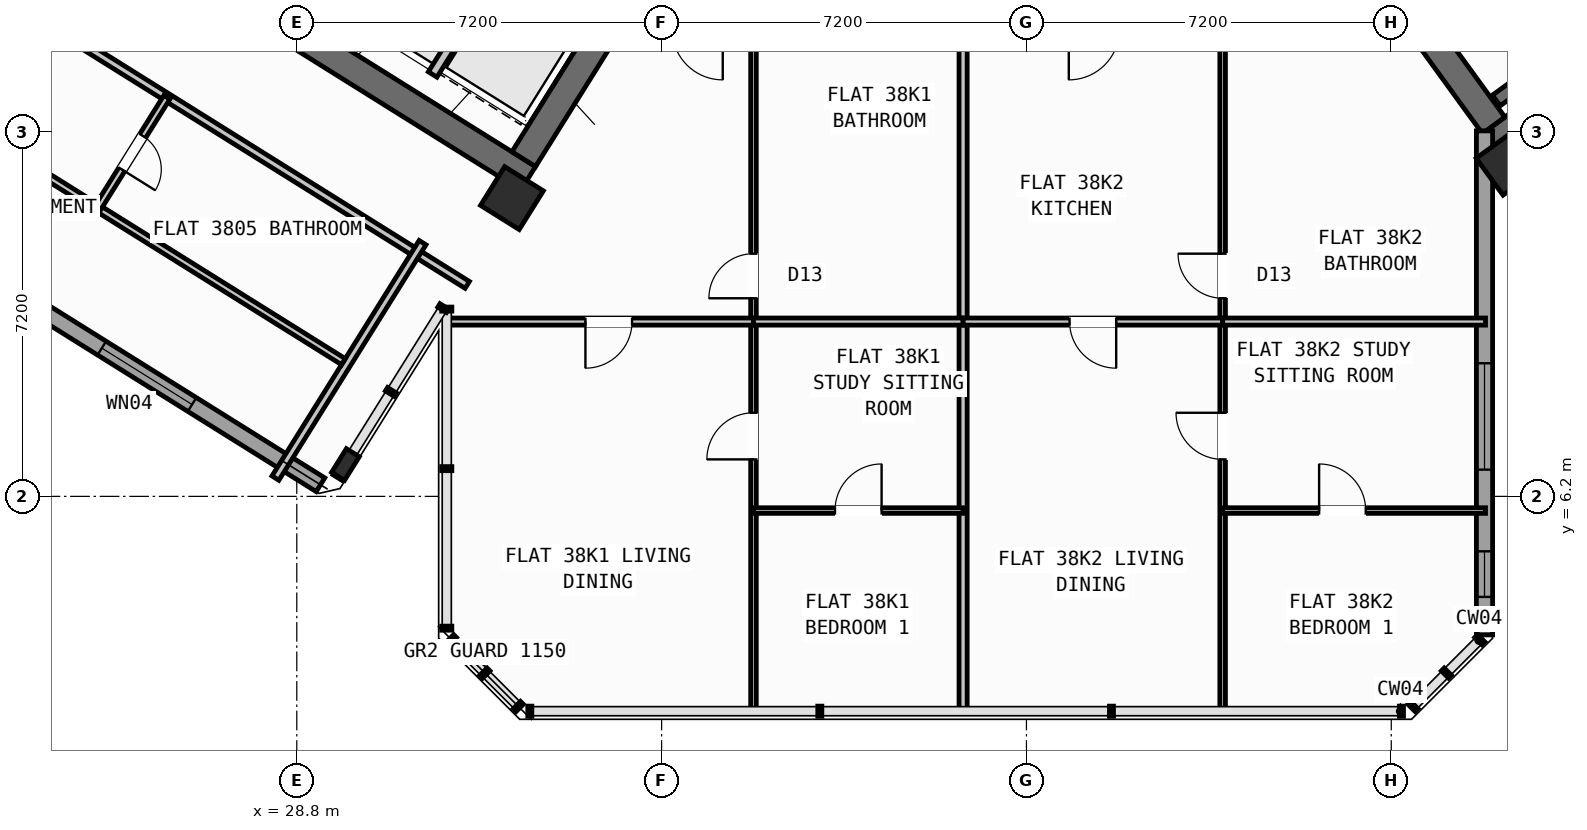
"""IFC4 building model, lengths in metres.
Left out: names, types, materials, properties, quantities, classifications, styles, units other than length and angle.
Written with IfcOpenShell. Run it as: python <this file> out.ifc"""

import sys

from ifc_helpers import new_model, si_unit, direction, frame, frame_2d, origin, origin_2d, place, context, subcontext, project, spatial, rectangle, hollow_rectangle, i_section, extrude, source, transform, mapped, element, fill, save


model = new_model("IFC4")
c1 = context("Model", 3, precision=1e-05, world=origin(), true_north=direction((0.0, 1.0)))
c2 = subcontext(c1, "Body", "Model", "MODEL_VIEW")
j1 = project(units=[si_unit("LENGTHUNIT", "METRE"), si_unit("PLANEANGLEUNIT", "RADIAN")], contexts=[c1])
p1 = place(None, origin())
s1 = spatial("IfcSite", under=j1, at=p1, CompositionType="ELEMENT")
p2 = place(p1, origin())
s2 = spatial("IfcBuilding", under=s1, at=p2, CompositionType="ELEMENT")
p3 = place(p2, frame((0.0, 0.0, 151.5)))
s3 = spatial("IfcBuildingStorey", under=s2, at=p3, CompositionType="ELEMENT", Elevation=151.5)
p4 = place(p3, frame((33.366, 12.477, 0.0), z_axis=(0.0, 0.0, 1.0), x_axis=(-0.848047359947, 0.529920442413, 0.0)))
e1 = element("IfcWall", 1, at=p4, inside=s3, PredefinedType="SHEAR", context=c2, shape_type="SweptSolid", body=[
    extrude(rectangle(XDim=13.14, YDim=0.55, at=frame_2d((6.57, 0.0))), origin(), (0.0, 0.0, 1.0), 3.35),
])
p5 = place(p3, frame((36.683, 18.304, 0.0), z_axis=(0.0, 0.0, 1.0), x_axis=(-0.529896466841, -0.848062341122, 0.0)))
e2 = element("IfcWall", 2, at=p5, inside=s3, PredefinedType="SHEAR", context=c2, shape_type="SweptSolid", body=[
    extrude(rectangle(XDim=6.425, YDim=0.55, at=frame_2d((3.212, 0.0))), origin(), (0.0, 0.0, 1.0), 3.35),
])
p6 = place(p3, frame((52.359, 13.14, 0.0), z_axis=(0.0, 0.0, 1.0), x_axis=(0.809014896919, 0.587788139183, 0.0)))
e3 = element("IfcWall", 3, at=p6, inside=s3, PredefinedType="SHEAR", context=c2, shape_type="SweptSolid", body=[
    extrude(rectangle(XDim=12.34, YDim=0.55, at=frame_2d((6.17, 0.0))), origin(), (0.0, 0.0, 1.0), 3.35),
])
p7 = place(p3, frame((52.42, 13.524, 0.0), z_axis=(0.0, 0.0, 1.0), x_axis=(-0.587802113096, 0.809004744015, 0.0)))
e4 = element("IfcWall", 4, at=p7, inside=s3, PredefinedType="SHEAR", context=c2, shape_type="SweptSolid", body=[
    extrude(rectangle(XDim=3.575, YDim=0.55, at=frame_2d((1.788, 0.0))), origin(), (0.0, 0.0, 1.0), 3.35),
])
m1 = source(origin(), c2, "Body", "SweptSolid", [
    extrude(hollow_rectangle(XDim=0.9, YDim=0.9, WallThickness=0.036, at=origin_2d()), origin(), (0.0, 0.0, 1.0), 3.6),
])
p8 = place(p3, frame((33.046, 12.087, 0.0), z_axis=(0.0, 0.0, 1.0), x_axis=(-0.848048096156, 0.529919264233, 0.0)))
e5 = element("IfcColumn", 5, at=p8, inside=s3, PredefinedType="COLUMN", context=c2, shape_type="MappedRepresentation", body=[
    mapped(m1, transform((0.0, 0.0, 0.0), scale=1.0)),
])
m2 = source(origin(), c2, "Body", "SweptSolid", [
    extrude(i_section(OverallWidth=0.3, OverallDepth=0.55, WebThickness=0.015, FlangeThickness=0.029, at=origin_2d()), origin(), (0.0, 0.0, 1.0), 3.6),
])
p9 = place(p3, frame((29.761, 6.829, 0.0), z_axis=(0.0, 0.0, 1.0), x_axis=(-0.848048096156, 0.529919264233, 0.0)))
e6 = element("IfcColumn", 6, at=p9, inside=s3, PredefinedType="COLUMN", context=c2, shape_type="MappedRepresentation", body=[
    mapped(m2, transform((0.0, 0.0, 0.0), scale=1.0)),
])
p10 = place(p3, frame((52.705, 12.773, 0.0), z_axis=(0.0, 0.0, 1.0), x_axis=(0.809016994375, 0.587785252292, 0.0)))
e7 = element("IfcColumn", 7, at=p10, inside=s3, PredefinedType="COLUMN", context=c2, shape_type="MappedRepresentation", body=[
    mapped(m1, transform((0.0, 0.0, 0.0), scale=1.0)),
])
p11 = place(p3, frame((29.268, 6.429, 0.0), z_axis=(0.0, 0.0, 1.0), x_axis=(-0.848049971435, 0.529916263149, 0.0)))
e8 = element("IfcWall", 8, at=p11, inside=s3, PredefinedType="STANDARD", context=c2, shape_type="SweptSolid", body=[
    extrude(rectangle(XDim=31.588, YDim=0.32, at=frame_2d((15.794, 0.0))), origin(), (0.0, 0.0, 1.0), 3.35),
])
p12 = place(p11, frame((16.362, 0.0, 0.0)))
e9 = element("IfcOpeningElement", 9, at=p12, cuts=e8, PredefinedType="OPENING", context=c2, shape_type="SweptSolid", body=[
    extrude(rectangle(XDim=1.2, YDim=2.15, at=frame_2d((0.6, 1.075))), frame((0.0, 0.17, 0.0), z_axis=(0.0, -1.0, 0.0), x_axis=(1.0, 0.0, 0.0)), (0.0, 0.0, 1.0), 0.34),
])
p13 = place(p11, frame((2.989, 0.0, 0.8)))
e10 = element("IfcOpeningElement", 10, at=p13, cuts=e8, PredefinedType="OPENING", context=c2, shape_type="SweptSolid", body=[
    extrude(rectangle(XDim=2.1, YDim=1.55, at=frame_2d((1.05, 0.775))), frame((0.0, 0.17, 0.0), z_axis=(0.0, -1.0, 0.0), x_axis=(1.0, 0.0, 0.0)), (0.0, 0.0, 1.0), 0.34),
])
p14 = place(p11, frame((8.359, 0.0, 0.8)))
e11 = element("IfcOpeningElement", 11, at=p14, cuts=e8, PredefinedType="OPENING", context=c2, shape_type="SweptSolid", body=[
    extrude(rectangle(XDim=2.1, YDim=1.55, at=frame_2d((1.05, 0.775))), frame((0.0, 0.17, 0.0), z_axis=(0.0, -1.0, 0.0), x_axis=(1.0, 0.0, 0.0)), (0.0, 0.0, 1.0), 0.34),
])
p15 = place(p11, frame((13.284, 0.0, 0.95)))
e12 = element("IfcOpeningElement", 12, at=p15, cuts=e8, PredefinedType="OPENING", context=c2, shape_type="SweptSolid", body=[
    extrude(rectangle(XDim=1.2, YDim=1.4, at=frame_2d((0.6, 0.7))), frame((0.0, 0.17, 0.0), z_axis=(0.0, -1.0, 0.0), x_axis=(1.0, 0.0, 0.0)), (0.0, 0.0, 1.0), 0.34),
])
p16 = place(p11, frame((20.259, 0.0, 0.95)))
e13 = element("IfcOpeningElement", 13, at=p16, cuts=e8, PredefinedType="OPENING", context=c2, shape_type="SweptSolid", body=[
    extrude(rectangle(XDim=1.2, YDim=1.4, at=frame_2d((0.6, 0.7))), frame((0.0, 0.17, 0.0), z_axis=(0.0, -1.0, 0.0), x_axis=(1.0, 0.0, 0.0)), (0.0, 0.0, 1.0), 0.34),
])
p17 = place(p11, frame((22.929, 0.0, 0.95)))
e14 = element("IfcOpeningElement", 14, at=p17, cuts=e8, PredefinedType="OPENING", context=c2, shape_type="SweptSolid", body=[
    extrude(rectangle(XDim=1.2, YDim=1.4, at=frame_2d((0.6, 0.7))), frame((0.0, 0.17, 0.0), z_axis=(0.0, -1.0, 0.0), x_axis=(1.0, 0.0, 0.0)), (0.0, 0.0, 1.0), 0.34),
])
p18 = place(p11, frame((27.481, 0.0, 0.8)))
e15 = element("IfcOpeningElement", 15, at=p18, cuts=e8, PredefinedType="OPENING", context=c2, shape_type="SweptSolid", body=[
    extrude(rectangle(XDim=2.1, YDim=1.55, at=frame_2d((1.05, 0.775))), frame((0.0, 0.17, 0.0), z_axis=(0.0, -1.0, 0.0), x_axis=(1.0, 0.0, 0.0)), (0.0, 0.0, 1.0), 0.34),
])
p19 = place(p3, frame((56.581, 7.439, 0.0), z_axis=(0.0, 0.0, 1.0), x_axis=(-0.587771678454, 0.809026856172, 0.0)))
e16 = element("IfcWall", 16, at=p19, inside=s3, PredefinedType="STANDARD", context=c2, shape_type="SweptSolid", body=[
    extrude(rectangle(XDim=6.824, YDim=0.32, at=frame_2d((3.412, 0.0))), origin(), (0.0, 0.0, 1.0), 2.775),
])
p20 = place(p19, frame((1.531, 0.0, 0.8)))
e17 = element("IfcOpeningElement", 17, at=p20, cuts=e16, PredefinedType="OPENING", context=c2, shape_type="SweptSolid", body=[
    extrude(rectangle(XDim=2.1, YDim=1.55, at=frame_2d((1.05, 0.775))), frame((0.0, 0.17, 0.0), z_axis=(0.0, -1.0, 0.0), x_axis=(1.0, 0.0, 0.0)), (0.0, 0.0, 1.0), 0.34),
])
p21 = place(p3, frame((52.24, 13.414, 0.0), z_axis=(0.0, 0.0, 1.0), x_axis=(0.0, -1.0, 0.0)))
e18 = element("IfcWall", 18, at=p21, inside=s3, PredefinedType="STANDARD", context=c2, shape_type="SweptSolid", body=[
    extrude(rectangle(XDim=9.948, YDim=0.32, at=frame_2d((4.974, 0.0))), origin(), (0.0, 0.0, 1.0), 3.35),
])
p22 = place(p21, frame((4.586, 0.0, 0.8)))
e19 = element("IfcOpeningElement", 19, at=p22, cuts=e18, PredefinedType="OPENING", context=c2, shape_type="SweptSolid", body=[
    extrude(rectangle(XDim=2.1, YDim=1.55, at=frame_2d((1.05, 0.775))), frame((0.0, 0.17, 0.0), z_axis=(0.0, -1.0, 0.0), x_axis=(1.0, 0.0, 0.0)), (0.0, 0.0, 1.0), 0.34),
])
p23 = place(p21, frame((8.298, 0.0, 1.0)))
e20 = element("IfcOpeningElement", 20, at=p23, cuts=e18, PredefinedType="OPENING", context=c2, shape_type="SweptSolid", body=[
    extrude(rectangle(XDim=0.9, YDim=1.25, at=frame_2d((0.45, 0.625))), frame((0.0, 0.17, 0.0), z_axis=(0.0, -1.0, 0.0), x_axis=(1.0, 0.0, 0.0)), (0.0, 0.0, 1.0), 0.34),
])
p24 = place(p3, frame((33.029, 17.003, 0.0), z_axis=(0.0, 0.0, 1.0), x_axis=(-0.529916267533, -0.848049968695, 0.0)))
e21 = element("IfcWall", 21, at=p24, inside=s3, PredefinedType="STANDARD", context=c2, shape_type="SweptSolid", body=[
    extrude(rectangle(XDim=2.92, YDim=0.2, at=frame_2d((1.46, 0.0))), origin(), (0.0, 0.0, 1.0), 3.34),
])
p25 = place(p3, frame((52.472, 14.013, 0.0), z_axis=(0.0, 0.0, 1.0), x_axis=(0.809028366311, 0.587769599847, 0.0)))
e22 = element("IfcWall", 22, at=p25, inside=s3, PredefinedType="SHEAR", context=c2, shape_type="SweptSolid", body=[
    extrude(rectangle(XDim=7.33, YDim=0.26, at=frame_2d((3.665, 0.0))), origin(), (0.0, 0.0, 1.0), 3.35),
])
p26 = place(p3, frame((32.164, 10.374, 0.0), z_axis=(0.0, 0.0, 1.0), x_axis=(-0.848044107957, 0.529925646633, 0.0)))
e23 = element("IfcWall", 23, at=p26, inside=s3, PredefinedType="PARTITIONING", context=c2, shape_type="SweptSolid", body=[
    extrude(rectangle(XDim=15.57, YDim=0.16, at=frame_2d((7.785, 0.0))), origin(), (0.0, 0.0, 1.0), 3.34),
])
p27 = place(p26, frame((10.83, 0.0, 0.0)))
e24 = element("IfcOpeningElement", 24, at=p27, cuts=e23, PredefinedType="OPENING", context=c2, shape_type="SweptSolid", body=[
    extrude(rectangle(XDim=1.0, YDim=2.1, at=frame_2d((0.5, 1.05))), frame((0.0, 0.09, 0.0), z_axis=(0.0, -1.0, 0.0), x_axis=(1.0, 0.0, 0.0)), (0.0, 0.0, 1.0), 0.18),
])
p28 = place(p3, frame((31.282, 11.208, 0.0), z_axis=(0.0, 0.0, 1.0), x_axis=(-0.529938869374, -0.84803584519, 0.0)))
e25 = element("IfcWall", 25, at=p28, inside=s3, PredefinedType="PARTITIONING", context=c2, shape_type="SweptSolid", body=[
    extrude(rectangle(XDim=5.48, YDim=0.16, at=frame_2d((2.74, 0.0))), origin(), (0.0, 0.0, 1.0), 3.34),
])
p29 = place(p3, frame((29.72, 8.859, 0.0), z_axis=(0.0, 0.0, 1.0), x_axis=(-0.848049134363, 0.529917602752, 0.0)))
e26 = element("IfcWall", 26, at=p29, inside=s3, PredefinedType="PLUMBINGWALL", context=c2, shape_type="SweptSolid", body=[
    extrude(rectangle(XDim=14.3, YDim=0.14, at=frame_2d((7.15, 0.0))), origin(), (0.0, 0.0, 1.0), 3.34),
])
p30 = place(p29, frame((9.57, 0.0, 0.0)))
e27 = element("IfcOpeningElement", 27, at=p30, cuts=e26, PredefinedType="OPENING", context=c2, shape_type="SweptSolid", body=[
    extrude(rectangle(XDim=0.92, YDim=2.08, at=frame_2d((0.46, 1.04))), frame((0.0, 0.08, 0.0), z_axis=(0.0, -1.0, 0.0), x_axis=(1.0, 0.0, 0.0)), (0.0, 0.0, 1.0), 0.16),
])
p31 = place(p3, frame((26.237, 14.078, 0.0), z_axis=(0.0, 0.0, 1.0), x_axis=(-0.52995640672, -0.848024885824, 0.0)))
e28 = element("IfcWall", 28, at=p31, inside=s3, PredefinedType="PLUMBINGWALL", context=c2, shape_type="SweptSolid", body=[
    extrude(rectangle(XDim=2.58, YDim=0.14, at=frame_2d((1.29, 0.0))), origin(), (0.0, 0.0, 1.0), 3.34),
])
p32 = place(p31, frame((0.9, 0.0, 0.0)))
e29 = element("IfcOpeningElement", 29, at=p32, cuts=e28, PredefinedType="OPENING", context=c2, shape_type="SweptSolid", body=[
    extrude(rectangle(XDim=0.78, YDim=2.05, at=frame_2d((0.39, 1.025))), frame((0.0, 0.08, 0.0), z_axis=(0.0, -1.0, 0.0), x_axis=(1.0, 0.0, 0.0)), (0.0, 0.0, 1.0), 0.16),
])
p33 = place(p3, frame((41.95, 1.96, 0.0), z_axis=(0.0, 0.0, 1.0), x_axis=(0.0, 1.0, 0.0)))
e30 = element("IfcWall", 30, at=p33, inside=s3, PredefinedType="PARTITIONING", context=c2, shape_type="SweptSolid", body=[
    extrude(rectangle(XDim=13.46, YDim=0.16, at=frame_2d((6.73, 0.0))), origin(), (0.0, 0.0, 1.0), 3.34),
])
p34 = place(p3, frame((37.813, 1.96, 0.0), z_axis=(0.0, 0.0, 1.0), x_axis=(0.0, 1.0, 0.0)))
e31 = element("IfcWall", 31, at=p34, inside=s3, PredefinedType="PARTITIONING", context=c2, shape_type="SweptSolid", body=[
    extrude(rectangle(XDim=13.46, YDim=0.11, at=frame_2d((6.73, 0.0))), origin(), (0.0, 0.0, 1.0), 3.34),
])
p35 = place(p34, frame((4.97, 0.0, 0.0)))
e32 = element("IfcOpeningElement", 32, at=p35, cuts=e31, PredefinedType="OPENING", context=c2, shape_type="SweptSolid", body=[
    extrude(rectangle(XDim=0.92, YDim=2.08, at=frame_2d((0.46, 1.04))), frame((0.0, 0.065, 0.0), z_axis=(0.0, -1.0, 0.0), x_axis=(1.0, 0.0, 0.0)), (0.0, 0.0, 1.0), 0.13),
])
p36 = place(p34, frame((8.15, 0.0, 0.0)))
e33 = element("IfcOpeningElement", 33, at=p36, cuts=e31, PredefinedType="OPENING", context=c2, shape_type="SweptSolid", body=[
    extrude(rectangle(XDim=0.88, YDim=2.08, at=frame_2d((0.44, 1.04))), frame((0.0, 0.065, 0.0), z_axis=(0.0, -1.0, 0.0), x_axis=(1.0, 0.0, 0.0)), (0.0, 0.0, 1.0), 0.13),
])
p37 = place(p3, frame((31.74, 9.65, 0.0), z_axis=(0.0, 0.0, 1.0), x_axis=(1.0, 0.0, 0.0)))
e34 = element("IfcWall", 34, at=p37, inside=s3, PredefinedType="PLUMBINGWALL", context=c2, shape_type="SweptSolid", body=[
    extrude(rectangle(XDim=6.073, YDim=0.14, at=frame_2d((3.037, 0.0))), origin(), (0.0, 0.0, 1.0), 3.34),
])
p38 = place(p37, frame((2.757, 0.0, 0.0)))
e35 = element("IfcOpeningElement", 35, at=p38, cuts=e34, PredefinedType="OPENING", context=c2, shape_type="SweptSolid", body=[
    extrude(rectangle(XDim=0.92, YDim=2.08, at=frame_2d((0.46, 1.04))), frame((0.0, 0.08, 0.0), z_axis=(0.0, -1.0, 0.0), x_axis=(1.0, 0.0, 0.0)), (0.0, 0.0, 1.0), 0.16),
])
p39 = place(p3, frame((37.813, 9.65, 0.0), z_axis=(0.0, 0.0, 1.0), x_axis=(1.0, 0.0, 0.0)))
e36 = element("IfcWall", 36, at=p39, inside=s3, PredefinedType="PLUMBINGWALL", context=c2, shape_type="SweptSolid", body=[
    extrude(rectangle(XDim=4.137, YDim=0.14, at=frame_2d((2.068, 0.0))), origin(), (0.0, 0.0, 1.0), 3.34),
])
p40 = place(p3, frame((37.813, 5.92, 0.0), z_axis=(0.0, 0.0, 1.0), x_axis=(1.0, 0.0, 0.0)))
e37 = element("IfcWall", 37, at=p40, inside=s3, PredefinedType="PARTITIONING", context=c2, shape_type="SweptSolid", body=[
    extrude(rectangle(XDim=4.137, YDim=0.11, at=frame_2d((2.068, 0.0))), origin(), (0.0, 0.0, 1.0), 3.34),
])
p41 = place(p40, frame((1.608, 0.0, 0.0)))
e38 = element("IfcOpeningElement", 38, at=p41, cuts=e37, PredefinedType="OPENING", context=c2, shape_type="SweptSolid", body=[
    extrude(rectangle(XDim=0.92, YDim=2.08, at=frame_2d((0.46, 1.04))), frame((0.0, 0.065, 0.0), z_axis=(0.0, -1.0, 0.0), x_axis=(1.0, 0.0, 0.0)), (0.0, 0.0, 1.0), 0.13),
])
p42 = place(p3, frame((47.072, 1.96, 0.0), z_axis=(0.0, 0.0, 1.0), x_axis=(0.0, 1.0, 0.0)))
e39 = element("IfcWall", 39, at=p42, inside=s3, PredefinedType="PARTITIONING", context=c2, shape_type="SweptSolid", body=[
    extrude(rectangle(XDim=13.46, YDim=0.11, at=frame_2d((6.73, 0.0))), origin(), (0.0, 0.0, 1.0), 3.34),
])
p43 = place(p42, frame((4.97, 0.0, 0.0)))
e40 = element("IfcOpeningElement", 40, at=p43, cuts=e39, PredefinedType="OPENING", context=c2, shape_type="SweptSolid", body=[
    extrude(rectangle(XDim=0.92, YDim=2.08, at=frame_2d((0.46, 1.04))), frame((0.0, 0.065, 0.0), z_axis=(0.0, -1.0, 0.0), x_axis=(1.0, 0.0, 0.0)), (0.0, 0.0, 1.0), 0.13),
])
p44 = place(p42, frame((8.15, 0.0, 0.0)))
e41 = element("IfcOpeningElement", 41, at=p44, cuts=e39, PredefinedType="OPENING", context=c2, shape_type="SweptSolid", body=[
    extrude(rectangle(XDim=0.88, YDim=2.08, at=frame_2d((0.44, 1.04))), frame((0.0, 0.065, 0.0), z_axis=(0.0, -1.0, 0.0), x_axis=(1.0, 0.0, 0.0)), (0.0, 0.0, 1.0), 0.13),
])
p45 = place(p3, frame((41.95, 9.65, 0.0), z_axis=(0.0, 0.0, 1.0), x_axis=(1.0, 0.0, 0.0)))
e42 = element("IfcWall", 42, at=p45, inside=s3, PredefinedType="PLUMBINGWALL", context=c2, shape_type="SweptSolid", body=[
    extrude(rectangle(XDim=5.122, YDim=0.14, at=frame_2d((2.561, 0.0))), origin(), (0.0, 0.0, 1.0), 3.34),
])
p46 = place(p45, frame((2.101, 0.0, 0.0)))
e43 = element("IfcOpeningElement", 43, at=p46, cuts=e42, PredefinedType="OPENING", context=c2, shape_type="SweptSolid", body=[
    extrude(rectangle(XDim=0.92, YDim=2.08, at=frame_2d((0.46, 1.04))), frame((0.0, 0.08, 0.0), z_axis=(0.0, -1.0, 0.0), x_axis=(1.0, 0.0, 0.0)), (0.0, 0.0, 1.0), 0.16),
])
p47 = place(p3, frame((47.072, 9.65, 0.0), z_axis=(0.0, 0.0, 1.0), x_axis=(1.0, 0.0, 0.0)))
e44 = element("IfcWall", 44, at=p47, inside=s3, PredefinedType="PLUMBINGWALL", context=c2, shape_type="SweptSolid", body=[
    extrude(rectangle(XDim=5.188, YDim=0.14, at=frame_2d((2.594, 0.0))), origin(), (0.0, 0.0, 1.0), 3.34),
])
p48 = place(p3, frame((47.072, 5.92, 0.0), z_axis=(0.0, 0.0, 1.0), x_axis=(1.0, 0.0, 0.0)))
e45 = element("IfcWall", 45, at=p48, inside=s3, PredefinedType="PARTITIONING", context=c2, shape_type="SweptSolid", body=[
    extrude(rectangle(XDim=5.188, YDim=0.11, at=frame_2d((2.594, 0.0))), origin(), (0.0, 0.0, 1.0), 3.34),
])
p49 = place(p48, frame((1.904, 0.0, 0.0)))
e46 = element("IfcOpeningElement", 46, at=p49, cuts=e45, PredefinedType="OPENING", context=c2, shape_type="SweptSolid", body=[
    extrude(rectangle(XDim=0.92, YDim=2.08, at=frame_2d((0.46, 1.04))), frame((0.0, 0.065, 0.0), z_axis=(0.0, -1.0, 0.0), x_axis=(1.0, 0.0, 0.0)), (0.0, 0.0, 1.0), 0.13),
])
m3 = source(origin(), c2, "Body", "SweptSolid", [
    extrude(rectangle(XDim=2.1, YDim=1.55, at=frame_2d((1.05, 0.775))), frame((0.0, 0.03, 0.0), z_axis=(0.0, -1.0, 0.0), x_axis=(1.0, 0.0, 0.0)), (0.0, 0.0, 1.0), 0.06),
])
p50 = place(p13, origin())
e47 = element("IfcWindow", 47, at=p50, inside=s3, PartitioningType="SINGLE_PANEL", PredefinedType="WINDOW", context=c2, shape_type="MappedRepresentation", body=[
    mapped(m3, transform((0.0, 0.0, 0.0), scale=1.0)),
])
fill(e10, e47)
p51 = place(p22, origin())
e48 = element("IfcWindow", 48, at=p51, inside=s3, PartitioningType="SINGLE_PANEL", PredefinedType="WINDOW", context=c2, shape_type="MappedRepresentation", body=[
    mapped(m3, transform((0.0, 0.0, 0.0), scale=1.0)),
])
fill(e19, e48)
m4 = source(origin(), c2, "Body", "SweptSolid", [
    extrude(rectangle(XDim=0.9, YDim=1.25, at=frame_2d((0.45, 0.625))), frame((0.0, 0.03, 0.0), z_axis=(0.0, -1.0, 0.0), x_axis=(1.0, 0.0, 0.0)), (0.0, 0.0, 1.0), 0.06),
])
p52 = place(p23, origin())
e49 = element("IfcWindow", 49, at=p52, inside=s3, PartitioningType="SINGLE_PANEL", PredefinedType="WINDOW", context=c2, shape_type="MappedRepresentation", body=[
    mapped(m4, transform((0.0, 0.0, 0.0), scale=1.0)),
])
fill(e20, e49)
m5 = source(origin(), c2, "Body", "SweptSolid", [
    extrude(rectangle(XDim=0.78, YDim=2.05, at=frame_2d((0.39, 1.025))), frame((0.0, 0.025, 0.0), z_axis=(0.0, -1.0, 0.0), x_axis=(1.0, 0.0, 0.0)), (0.0, 0.0, 1.0), 0.05),
])
p53 = place(p32, origin())
e50 = element("IfcDoor", 50, at=p53, inside=s3, OperationType="SINGLE_SWING_RIGHT", PredefinedType="DOOR", context=c2, shape_type="MappedRepresentation", body=[
    mapped(m5, transform((0.0, 0.0, 0.0), scale=1.0)),
])
fill(e29, e50)
m6 = source(origin(), c2, "Body", "SweptSolid", [
    extrude(rectangle(XDim=0.92, YDim=2.08, at=frame_2d((0.46, 1.04))), frame((0.0, 0.025, 0.0), z_axis=(0.0, -1.0, 0.0), x_axis=(1.0, 0.0, 0.0)), (0.0, 0.0, 1.0), 0.05),
])
p54 = place(p35, origin())
e51 = element("IfcDoor", 51, at=p54, inside=s3, OperationType="SINGLE_SWING_LEFT", PredefinedType="DOOR", context=c2, shape_type="MappedRepresentation", body=[
    mapped(m6, transform((0.0, 0.0, 0.0), scale=1.0)),
])
fill(e32, e51)
p55 = place(p41, origin())
e52 = element("IfcDoor", 52, at=p55, inside=s3, OperationType="SINGLE_SWING_RIGHT", PredefinedType="DOOR", context=c2, shape_type="MappedRepresentation", body=[
    mapped(m6, transform((0.0, 0.0, 0.0), scale=1.0)),
])
fill(e38, e52)
p56 = place(p38, frame((0.92, 0.0, 0.0), z_axis=(0.0, 0.0, 1.0), x_axis=(-1.0, 0.0, 0.0)))
e53 = element("IfcDoor", 53, at=p56, inside=s3, OperationType="SINGLE_SWING_RIGHT", PredefinedType="DOOR", context=c2, shape_type="MappedRepresentation", body=[
    mapped(m6, transform((0.0, 0.0, 0.0), scale=1.0)),
])
fill(e35, e53)
m7 = source(origin(), c2, "Body", "SweptSolid", [
    extrude(rectangle(XDim=0.88, YDim=2.08, at=frame_2d((0.44, 1.04))), frame((0.0, 0.025, 0.0), z_axis=(0.0, -1.0, 0.0), x_axis=(1.0, 0.0, 0.0)), (0.0, 0.0, 1.0), 0.05),
])
p57 = place(p36, origin())
e54 = element("IfcDoor", 54, at=p57, inside=s3, OperationType="SINGLE_SWING_LEFT", PredefinedType="DOOR", context=c2, shape_type="MappedRepresentation", body=[
    mapped(m7, transform((0.0, 0.0, 0.0), scale=1.0)),
])
fill(e33, e54)
p58 = place(p43, origin())
e55 = element("IfcDoor", 55, at=p58, inside=s3, OperationType="SINGLE_SWING_RIGHT", PredefinedType="DOOR", context=c2, shape_type="MappedRepresentation", body=[
    mapped(m6, transform((0.0, 0.0, 0.0), scale=1.0)),
])
fill(e40, e55)
p59 = place(p49, origin())
e56 = element("IfcDoor", 56, at=p59, inside=s3, OperationType="SINGLE_SWING_LEFT", PredefinedType="DOOR", context=c2, shape_type="MappedRepresentation", body=[
    mapped(m6, transform((0.0, 0.0, 0.0), scale=1.0)),
])
fill(e46, e56)
p60 = place(p46, frame((0.92, 0.0, 0.0), z_axis=(0.0, 0.0, 1.0), x_axis=(-1.0, 0.0, 0.0)))
e57 = element("IfcDoor", 57, at=p60, inside=s3, OperationType="SINGLE_SWING_LEFT", PredefinedType="DOOR", context=c2, shape_type="MappedRepresentation", body=[
    mapped(m6, transform((0.0, 0.0, 0.0), scale=1.0)),
])
fill(e43, e57)
p61 = place(p44, origin())
e58 = element("IfcDoor", 58, at=p61, inside=s3, OperationType="SINGLE_SWING_RIGHT", PredefinedType="DOOR", context=c2, shape_type="MappedRepresentation", body=[
    mapped(m7, transform((0.0, 0.0, 0.0), scale=1.0)),
])
fill(e41, e58)
save(model, sys.argv[1])
